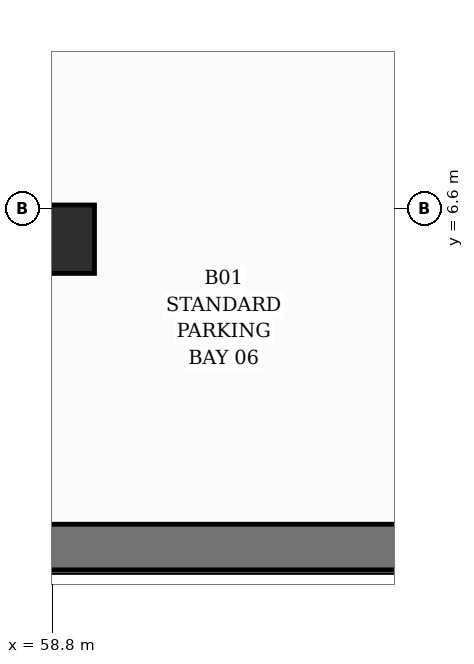
"""IFC4 building model, lengths in metres.
Left out: names, types, materials, properties, quantities, classifications, styles, units other than length and angle.
Written with IfcOpenShell. Run it as: python <this file> out.ifc"""

import sys

from ifc_helpers import new_model, si_unit, direction, frame, frame_2d, origin, origin_2d, place, context, subcontext, project, spatial, rectangle, extrude, element, save


model = new_model("IFC4")
c1 = context("Model", 3, precision=1e-05, world=origin(), true_north=direction((0.0, 1.0)))
c2 = subcontext(c1, "Body", "Model", "MODEL_VIEW")
j1 = project(units=[si_unit("LENGTHUNIT", "METRE"), si_unit("PLANEANGLEUNIT", "RADIAN")], contexts=[c1])
p1 = place(None, origin())
s1 = spatial("IfcSite", under=j1, at=p1, CompositionType="ELEMENT")
p2 = place(p1, origin())
s2 = spatial("IfcBuilding", under=s1, at=p2, CompositionType="ELEMENT")
p3 = place(p2, frame((0.0, 0.0, -4.5)))
s3 = spatial("IfcBuildingStorey", under=s2, at=p3, CompositionType="ELEMENT", Elevation=-4.5)
p4 = place(p3, frame((54.475, 2.15, 0.0), z_axis=(0.0, 0.0, 1.0), x_axis=(1.0, 0.0, 0.0)))
e1 = element("IfcWall", 1, at=p4, inside=s3, PredefinedType="USERDEFINED", context=c2, shape_type="SweptSolid", body=[
    extrude(rectangle(XDim=9.173, YDim=0.6, at=frame_2d((4.586, 0.0))), origin(), (0.0, 0.0, 1.0), 4.5),
])
p5 = place(p3, frame((58.9, 6.2, 0.0), z_axis=(0.0, 0.0, 1.0), x_axis=(1.0, 0.0, 0.0)))
e2 = element("IfcColumn", 2, at=p5, inside=s3, PredefinedType="COLUMN", context=c2, shape_type="SweptSolid", body=[
    extrude(rectangle(XDim=0.9, YDim=0.9, at=origin_2d()), origin(), (0.0, 0.0, 1.0), 4.2),
])
save(model, sys.argv[1])
